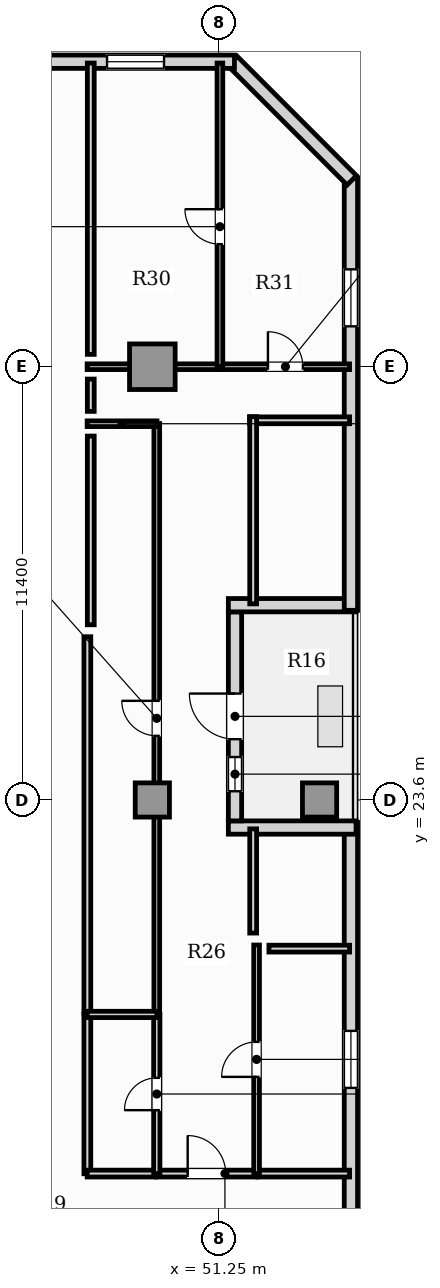
"""IFC4 building model, lengths in metres.
Left out: names, types, materials, properties, quantities, classifications, styles, units other than length and angle.
Written with IfcOpenShell. Run it as: python <this file> out.ifc"""

import sys

from ifc_helpers import new_model, si_unit, direction, frame, frame_2d, origin, origin_2d, place, context, subcontext, project, spatial, rectangle, hollow_rectangle, extrude, element, fill, save


model = new_model("IFC4")
c1 = context("Model", 3, precision=1e-05, world=origin(), true_north=direction((0.0, 1.0)))
c2 = subcontext(c1, "Body", "Model", "MODEL_VIEW")
j1 = project(units=[si_unit("LENGTHUNIT", "METRE"), si_unit("PLANEANGLEUNIT", "RADIAN")], contexts=[c1])
p1 = place(None, origin())
s1 = spatial("IfcSite", under=j1, at=p1, CompositionType="ELEMENT")
p2 = place(p1, origin())
s2 = spatial("IfcBuilding", under=s1, at=p2, CompositionType="ELEMENT")
p3 = place(p2, frame((0.0, 0.0, 104.15)))
s3 = spatial("IfcBuildingStorey", under=s2, at=p3, CompositionType="ELEMENT", Elevation=104.15)
p4 = place(p3, frame((49.5, 35.0, 0.0), z_axis=(0.0, 0.0, 1.0), x_axis=(1.0, 0.0, 0.0)))
e1 = element("IfcColumn", 1, at=p4, inside=s3, PredefinedType="USERDEFINED", context=c2, shape_type="SweptSolid", body=[
    extrude(hollow_rectangle(XDim=1.2, YDim=1.2, WallThickness=0.07, at=origin_2d()), origin(), (0.0, 0.0, 1.0), 3.85),
])
for number, where, z_axis, x_axis in (
    (2, (49.5, 23.6, 0.0), (0.0, 0.0, 1.0), (1.0, 0.0, 0.0)),
    (3, (53.9, 23.6, 0.0), (0.0, 0.0, 1.0), (1.0, 0.0, 0.0)),
):
    element("IfcColumn", number, at=place(p3, frame(where, z_axis=z_axis, x_axis=x_axis)), inside=s3, PredefinedType="COLUMN", context=c2, shape_type="SweptSolid", body=[
        extrude(rectangle(XDim=0.9, YDim=0.9, at=origin_2d()), origin(), (0.0, 0.0, 1.0), 3.85),
    ])
p5 = place(p3, frame((54.725, 3.24, 0.0), z_axis=(0.0, 0.0, 1.0), x_axis=(0.0, 1.0, 0.0)))
e4 = element("IfcWall", 4, at=p5, inside=s3, PredefinedType="SOLIDWALL", context=c2, shape_type="SweptSolid", body=[
    extrude(rectangle(XDim=19.77, YDim=0.35, at=frame_2d((9.885, 0.0))), origin(), (0.0, 0.0, 1.0), 3.6),
])
p6 = place(p5, frame((12.784, 0.0, 0.9)))
e5 = element("IfcOpeningElement", 5, at=p6, cuts=e4, PredefinedType="OPENING", context=c2, shape_type="SweptSolid", body=[
    extrude(rectangle(XDim=1.5, YDim=1.95, at=frame_2d((0.75, 0.975))), frame((0.0, 0.185, 0.0), z_axis=(0.0, -1.0, 0.0), x_axis=(1.0, 0.0, 0.0)), (0.0, 0.0, 1.0), 0.37),
])
p7 = place(p3, frame((54.86, 22.875, 0.0), z_axis=(0.0, 0.0, 1.0), x_axis=(-1.0, 0.0, 0.0)))
e6 = element("IfcWall", 6, at=p7, inside=s3, PredefinedType="SOLIDWALL", context=c2, shape_type="SweptSolid", body=[
    extrude(rectangle(XDim=3.36, YDim=0.35, at=frame_2d((1.68, 0.0))), origin(), (0.0, 0.0, 1.0), 3.6),
])
p8 = place(p3, frame((51.675, 23.05, 0.0), z_axis=(0.0, 0.0, 1.0), x_axis=(0.0, 1.0, 0.0)))
e7 = element("IfcWall", 7, at=p8, inside=s3, PredefinedType="SOLIDWALL", context=c2, shape_type="SweptSolid", body=[
    extrude(rectangle(XDim=5.5, YDim=0.35, at=frame_2d((2.75, 0.0))), origin(), (0.0, 0.0, 1.0), 3.6),
])
p9 = place(p8, frame((2.15, 0.0, 0.0)))
e8 = element("IfcOpeningElement", 8, at=p9, cuts=e7, PredefinedType="OPENING", context=c2, shape_type="SweptSolid", body=[
    extrude(rectangle(XDim=1.2, YDim=2.2, at=frame_2d((0.6, 1.1))), frame((0.0, 0.185, 0.0), z_axis=(0.0, -1.0, 0.0), x_axis=(1.0, 0.0, 0.0)), (0.0, 0.0, 1.0), 0.37),
])
p10 = place(p8, frame((0.78, 0.0, 0.95)))
e9 = element("IfcOpeningElement", 9, at=p10, cuts=e7, PredefinedType="OPENING", context=c2, shape_type="SweptSolid", body=[
    extrude(rectangle(XDim=0.9, YDim=1.5, at=frame_2d((0.45, 0.75))), frame((0.0, 0.185, 0.0), z_axis=(0.0, -1.0, 0.0), x_axis=(1.0, 0.0, 0.0)), (0.0, 0.0, 1.0), 0.37),
])
p11 = place(p3, frame((51.5, 28.725, 0.0), z_axis=(0.0, 0.0, 1.0), x_axis=(1.0, 0.0, 0.0)))
e10 = element("IfcWall", 10, at=p11, inside=s3, PredefinedType="SOLIDWALL", context=c2, shape_type="SweptSolid", body=[
    extrude(rectangle(XDim=3.36, YDim=0.35, at=frame_2d((1.68, 0.0))), origin(), (0.0, 0.0, 1.0), 3.6),
])
p12 = place(p3, frame((54.725, 28.59, 0.0), z_axis=(0.0, 0.0, 1.0), x_axis=(0.0, 1.0, 0.0)))
e11 = element("IfcWall", 11, at=p12, inside=s3, PredefinedType="SOLIDWALL", context=c2, shape_type="SweptSolid", body=[
    extrude(rectangle(XDim=11.37, YDim=0.35, at=frame_2d((5.685, 0.0))), origin(), (0.0, 0.0, 1.0), 3.6),
])
p13 = place(p12, frame((7.472, 0.0, 0.9)))
e12 = element("IfcOpeningElement", 12, at=p13, cuts=e11, PredefinedType="OPENING", context=c2, shape_type="SweptSolid", body=[
    extrude(rectangle(XDim=1.5, YDim=1.95, at=frame_2d((0.75, 0.975))), frame((0.0, 0.185, 0.0), z_axis=(0.0, -1.0, 0.0), x_axis=(1.0, 0.0, 0.0)), (0.0, 0.0, 1.0), 0.37),
])
p14 = place(p3, frame((54.748, 39.905, 0.0), z_axis=(0.0, 0.0, 1.0), x_axis=(-0.707106781187, 0.707106781187, 0.0)))
e13 = element("IfcWall", 13, at=p14, inside=s3, PredefinedType="SOLIDWALL", context=c2, shape_type="SweptSolid", body=[
    extrude(rectangle(XDim=4.446, YDim=0.35, at=frame_2d((2.223, 0.0))), origin(), (0.0, 0.0, 1.0), 3.6),
])
p15 = place(p3, frame((51.66, 43.025, 0.0), z_axis=(0.0, 0.0, 1.0), x_axis=(-1.0, 0.0, 0.0)))
e14 = element("IfcWall", 14, at=p15, inside=s3, PredefinedType="SOLIDWALL", context=c2, shape_type="SweptSolid", body=[
    extrude(rectangle(XDim=45.82, YDim=0.35, at=frame_2d((22.91, 0.0))), origin(), (0.0, 0.0, 1.0), 3.6),
])
p16 = place(p15, frame((42.468, 0.0, 0.9)))
e15 = element("IfcOpeningElement", 15, at=p16, cuts=e14, PredefinedType="OPENING", context=c2, shape_type="SweptSolid", body=[
    extrude(rectangle(XDim=1.5, YDim=1.95, at=frame_2d((0.75, 0.975))), frame((0.0, 0.185, 0.0), z_axis=(0.0, -1.0, 0.0), x_axis=(1.0, 0.0, 0.0)), (0.0, 0.0, 1.0), 0.37),
])
p17 = place(p15, frame((1.853, 0.0, 0.9)))
e16 = element("IfcOpeningElement", 16, at=p17, cuts=e14, PredefinedType="OPENING", context=c2, shape_type="SweptSolid", body=[
    extrude(rectangle(XDim=1.5, YDim=1.95, at=frame_2d((0.75, 0.975))), frame((0.0, 0.185, 0.0), z_axis=(0.0, -1.0, 0.0), x_axis=(1.0, 0.0, 0.0)), (0.0, 0.0, 1.0), 0.37),
])
p18 = place(p15, frame((36.45, 0.0, 0.9)))
e17 = element("IfcOpeningElement", 17, at=p18, cuts=e14, PredefinedType="OPENING", context=c2, shape_type="SweptSolid", body=[
    extrude(rectangle(XDim=1.5, YDim=1.95, at=frame_2d((0.75, 0.975))), frame((0.0, 0.185, 0.0), z_axis=(0.0, -1.0, 0.0), x_axis=(1.0, 0.0, 0.0)), (0.0, 0.0, 1.0), 0.37),
])
p19 = place(p15, frame((32.639, 0.0, 0.9)))
e18 = element("IfcOpeningElement", 18, at=p19, cuts=e14, PredefinedType="OPENING", context=c2, shape_type="SweptSolid", body=[
    extrude(rectangle(XDim=1.5, YDim=1.95, at=frame_2d((0.75, 0.975))), frame((0.0, 0.185, 0.0), z_axis=(0.0, -1.0, 0.0), x_axis=(1.0, 0.0, 0.0)), (0.0, 0.0, 1.0), 0.37),
])
p20 = place(p15, frame((27.743, 0.0, 0.9)))
e19 = element("IfcOpeningElement", 19, at=p20, cuts=e14, PredefinedType="OPENING", context=c2, shape_type="SweptSolid", body=[
    extrude(rectangle(XDim=1.5, YDim=1.95, at=frame_2d((0.75, 0.975))), frame((0.0, 0.185, 0.0), z_axis=(0.0, -1.0, 0.0), x_axis=(1.0, 0.0, 0.0)), (0.0, 0.0, 1.0), 0.37),
])
p21 = place(p15, frame((23.711, 0.0, 0.9)))
e20 = element("IfcOpeningElement", 20, at=p21, cuts=e14, PredefinedType="OPENING", context=c2, shape_type="SweptSolid", body=[
    extrude(rectangle(XDim=1.5, YDim=1.95, at=frame_2d((0.75, 0.975))), frame((0.0, 0.185, 0.0), z_axis=(0.0, -1.0, 0.0), x_axis=(1.0, 0.0, 0.0)), (0.0, 0.0, 1.0), 0.37),
])
p22 = place(p15, frame((19.194, 0.0, 0.9)))
e21 = element("IfcOpeningElement", 21, at=p22, cuts=e14, PredefinedType="OPENING", context=c2, shape_type="SweptSolid", body=[
    extrude(rectangle(XDim=1.5, YDim=1.95, at=frame_2d((0.75, 0.975))), frame((0.0, 0.185, 0.0), z_axis=(0.0, -1.0, 0.0), x_axis=(1.0, 0.0, 0.0)), (0.0, 0.0, 1.0), 0.37),
])
p23 = place(p15, frame((14.876, 0.0, 0.9)))
e22 = element("IfcOpeningElement", 22, at=p23, cuts=e14, PredefinedType="OPENING", context=c2, shape_type="SweptSolid", body=[
    extrude(rectangle(XDim=1.5, YDim=1.95, at=frame_2d((0.75, 0.975))), frame((0.0, 0.185, 0.0), z_axis=(0.0, -1.0, 0.0), x_axis=(1.0, 0.0, 0.0)), (0.0, 0.0, 1.0), 0.37),
])
p24 = place(p15, frame((11.167, 0.0, 0.9)))
e23 = element("IfcOpeningElement", 23, at=p24, cuts=e14, PredefinedType="OPENING", context=c2, shape_type="SweptSolid", body=[
    extrude(rectangle(XDim=1.5, YDim=1.95, at=frame_2d((0.75, 0.975))), frame((0.0, 0.185, 0.0), z_axis=(0.0, -1.0, 0.0), x_axis=(1.0, 0.0, 0.0)), (0.0, 0.0, 1.0), 0.37),
])
p25 = place(p15, frame((7.337, 0.0, 0.9)))
e24 = element("IfcOpeningElement", 24, at=p25, cuts=e14, PredefinedType="OPENING", context=c2, shape_type="SweptSolid", body=[
    extrude(rectangle(XDim=1.5, YDim=1.95, at=frame_2d((0.75, 0.975))), frame((0.0, 0.185, 0.0), z_axis=(0.0, -1.0, 0.0), x_axis=(1.0, 0.0, 0.0)), (0.0, 0.0, 1.0), 0.37),
])
p26 = place(p3, frame((49.612, 13.77, 0.0), z_axis=(0.0, 0.0, 1.0), x_axis=(1.0, 0.0, 0.0)))
e25 = element("IfcWall", 25, at=p26, inside=s3, PredefinedType="PARTITIONING", context=c2, shape_type="SweptSolid", body=[
    extrude(rectangle(XDim=2.636, YDim=0.18, at=frame_2d((1.318, 0.0))), origin(), (0.0, 0.0, 1.0), 3.6),
])
p27 = place(p26, frame((0.818, 0.0, 0.0)))
e26 = element("IfcOpeningElement", 26, at=p27, cuts=e25, PredefinedType="OPENING", context=c2, shape_type="SweptSolid", body=[
    extrude(rectangle(XDim=1.0, YDim=2.15, at=frame_2d((0.5, 1.075))), frame((0.0, 0.1, 0.0), z_axis=(0.0, -1.0, 0.0), x_axis=(1.0, 0.0, 0.0)), (0.0, 0.0, 1.0), 0.2),
])
p28 = place(p3, frame((47.79, 13.765, 0.0), z_axis=(0.0, 0.0, 1.0), x_axis=(0.0, 1.0, 0.0)))
e27 = element("IfcWall", 27, at=p28, inside=s3, PredefinedType="PARTITIONING", context=c2, shape_type="SweptSolid", body=[
    extrude(rectangle(XDim=4.198, YDim=0.18, at=frame_2d((2.099, 0.0))), origin(), (0.0, 0.0, 1.0), 3.6),
])
p29 = place(p3, frame((47.785, 13.77, 0.0), z_axis=(0.0, 0.0, 1.0), x_axis=(1.0, 0.0, 0.0)))
e28 = element("IfcWall", 28, at=p29, inside=s3, PredefinedType="PARTITIONING", context=c2, shape_type="SweptSolid", body=[
    extrude(rectangle(XDim=1.797, YDim=0.18, at=frame_2d((0.898, 0.0))), origin(), (0.0, 0.0, 1.0), 3.6),
])
p30 = place(p3, frame((47.79, 17.992, 0.0), z_axis=(0.0, 0.0, 1.0), x_axis=(0.0, 1.0, 0.0)))
e29 = element("IfcWall", 29, at=p30, inside=s3, PredefinedType="PARTITIONING", context=c2, shape_type="SweptSolid", body=[
    extrude(rectangle(XDim=9.903, YDim=0.18, at=frame_2d((4.951, 0.0))), origin(), (0.0, 0.0, 1.0), 3.6),
])
p31 = place(p3, frame((52.278, 13.77, 0.0), z_axis=(0.0, 0.0, 1.0), x_axis=(1.0, 0.0, 0.0)))
e30 = element("IfcWall", 30, at=p31, inside=s3, PredefinedType="PARTITIONING", context=c2, shape_type="SweptSolid", body=[
    extrude(rectangle(XDim=2.412, YDim=0.18, at=frame_2d((1.206, 0.0))), origin(), (0.0, 0.0, 1.0), 3.6),
])
p32 = place(p3, frame((49.617, 13.765, 0.0), z_axis=(0.0, 0.0, 1.0), x_axis=(0.0, 1.0, 0.0)))
e31 = element("IfcWall", 31, at=p32, inside=s3, PredefinedType="PLUMBINGWALL", context=c2, shape_type="SweptSolid", body=[
    extrude(rectangle(XDim=4.198, YDim=0.165, at=frame_2d((2.099, 0.0))), origin(), (0.0, 0.0, 1.0), 3.056),
])
p33 = place(p32, frame((1.674, 0.0, 0.0)))
e32 = element("IfcOpeningElement", 32, at=p33, cuts=e31, PredefinedType="OPENING", context=c2, shape_type="SweptSolid", body=[
    extrude(rectangle(XDim=0.85, YDim=2.1, at=frame_2d((0.425, 1.05))), frame((0.0, 0.093, 0.0), z_axis=(0.0, -1.0, 0.0), x_axis=(1.0, 0.0, 0.0)), (0.0, 0.0, 1.0), 0.185),
])
p34 = place(p3, frame((49.617, 17.992, 0.0), z_axis=(0.0, 0.0, 1.0), x_axis=(0.0, 1.0, 0.0)))
e33 = element("IfcWall", 33, at=p34, inside=s3, PredefinedType="PARTITIONING", context=c2, shape_type="SweptSolid", body=[
    extrude(rectangle(XDim=15.513, YDim=0.15, at=frame_2d((7.756, 0.0))), origin(), (0.0, 0.0, 1.0), 3.056),
])
p35 = place(p34, frame((7.296, 0.0, 0.0)))
e34 = element("IfcOpeningElement", 34, at=p35, cuts=e33, PredefinedType="OPENING", context=c2, shape_type="SweptSolid", body=[
    extrude(rectangle(XDim=0.92, YDim=2.1, at=frame_2d((0.46, 1.05))), frame((0.0, 0.085, 0.0), z_axis=(0.0, -1.0, 0.0), x_axis=(1.0, 0.0, 0.0)), (0.0, 0.0, 1.0), 0.17),
])
p36 = place(p3, frame((47.785, 33.5, 0.0), z_axis=(0.0, 0.0, 1.0), x_axis=(1.0, 0.0, 0.0)))
e35 = element("IfcWall", 35, at=p36, inside=s3, PredefinedType="PARTITIONING", context=c2, shape_type="SweptSolid", body=[
    extrude(rectangle(XDim=1.837, YDim=0.15, at=frame_2d((0.918, 0.0))), origin(), (0.0, 0.0, 1.0), 3.6),
])
p37 = place(p3, frame((52.243, 13.765, 0.0), z_axis=(0.0, 0.0, 1.0), x_axis=(0.0, 1.0, 0.0)))
e36 = element("IfcWall", 36, at=p37, inside=s3, PredefinedType="PARTITIONING", context=c2, shape_type="SweptSolid", body=[
    extrude(rectangle(XDim=6.019, YDim=0.15, at=frame_2d((3.009, 0.0))), origin(), (0.0, 0.0, 1.0), 3.6),
])
p38 = place(p37, frame((2.549, 0.0, 0.0)))
e37 = element("IfcOpeningElement", 37, at=p38, cuts=e36, PredefinedType="OPENING", context=c2, shape_type="SweptSolid", body=[
    extrude(rectangle(XDim=0.92, YDim=2.1, at=frame_2d((0.46, 1.05))), frame((0.0, 0.085, 0.0), z_axis=(0.0, -1.0, 0.0), x_axis=(1.0, 0.0, 0.0)), (0.0, 0.0, 1.0), 0.17),
])
p39 = place(p3, frame((47.785, 35.0, 0.0), z_axis=(0.0, 0.0, 1.0), x_axis=(1.0, 0.0, 0.0)))
e38 = element("IfcWall", 38, at=p39, inside=s3, PredefinedType="PARTITIONING", context=c2, shape_type="SweptSolid", body=[
    extrude(rectangle(XDim=3.498, YDim=0.15, at=frame_2d((1.749, 0.0))), origin(), (0.0, 0.0, 1.0), 2.983),
])
p40 = place(p3, frame((51.313, 35.0, 0.0), z_axis=(0.0, 0.0, 1.0), x_axis=(1.0, 0.0, 0.0)))
e39 = element("IfcWall", 39, at=p40, inside=s3, PredefinedType="PARTITIONING", context=c2, shape_type="SweptSolid", body=[
    extrude(rectangle(XDim=3.377, YDim=0.15, at=frame_2d((1.688, 0.0))), origin(), (0.0, 0.0, 1.0), 3.6),
])
p41 = place(p40, frame((1.229, 0.0, 0.0)))
e40 = element("IfcOpeningElement", 40, at=p41, cuts=e39, PredefinedType="OPENING", context=c2, shape_type="SweptSolid", body=[
    extrude(rectangle(XDim=0.92, YDim=2.1, at=frame_2d((0.46, 1.05))), frame((0.0, 0.085, 0.0), z_axis=(0.0, -1.0, 0.0), x_axis=(1.0, 0.0, 0.0)), (0.0, 0.0, 1.0), 0.17),
])
p42 = place(p3, frame((47.785, 17.957, 0.0), z_axis=(0.0, 0.0, 1.0), x_axis=(1.0, 0.0, 0.0)))
e41 = element("IfcWall", 41, at=p42, inside=s3, PredefinedType="PLUMBINGWALL", context=c2, shape_type="SweptSolid", body=[
    extrude(rectangle(XDim=1.837, YDim=0.165, at=frame_2d((0.918, 0.0))), origin(), (0.0, 0.0, 1.0), 3.6),
])
p43 = place(p3, frame((51.278, 34.995, 0.0), z_axis=(0.0, 0.0, 1.0), x_axis=(0.0, 1.0, 0.0)))
e42 = element("IfcWall", 42, at=p43, inside=s3, PredefinedType="PARTITIONING", context=c2, shape_type="SweptSolid", body=[
    extrude(rectangle(XDim=7.995, YDim=0.15, at=frame_2d((3.998, 0.0))), origin(), (0.0, 0.0, 1.0), 3.6),
])
p44 = place(p43, frame((3.23, 0.0, 0.0)))
e43 = element("IfcOpeningElement", 43, at=p44, cuts=e42, PredefinedType="OPENING", context=c2, shape_type="SweptSolid", body=[
    extrude(rectangle(XDim=0.92, YDim=2.1, at=frame_2d((0.46, 1.05))), frame((0.0, 0.085, 0.0), z_axis=(0.0, -1.0, 0.0), x_axis=(1.0, 0.0, 0.0)), (0.0, 0.0, 1.0), 0.17),
])
p45 = place(p3, frame((47.88, 33.825, 0.0), z_axis=(0.0, 0.0, 1.0), x_axis=(0.0, 1.0, 0.0)))
e44 = element("IfcWall", 44, at=p45, inside=s3, PredefinedType="PARTITIONING", context=c2, shape_type="SweptSolid", body=[
    extrude(rectangle(XDim=0.85, YDim=0.18, at=frame_2d((0.425, 0.0))), origin(), (0.0, 0.0, 1.0), 3.6),
])
p46 = place(p3, frame((54.69, 33.59, 0.0), z_axis=(0.0, 0.0, 1.0), x_axis=(-1.0, 0.0, 0.0)))
e45 = element("IfcWall", 45, at=p46, inside=s3, PredefinedType="PARTITIONING", context=c2, shape_type="SweptSolid", body=[
    extrude(rectangle(XDim=2.632, YDim=0.18, at=frame_2d((1.316, 0.0))), origin(), (0.0, 0.0, 1.0), 3.6),
])
p47 = place(p3, frame((52.153, 33.685, 0.0), z_axis=(0.0, 0.0, 1.0), x_axis=(0.0, -1.0, 0.0)))
e46 = element("IfcWall", 46, at=p47, inside=s3, PredefinedType="PARTITIONING", context=c2, shape_type="SweptSolid", body=[
    extrude(rectangle(XDim=4.925, YDim=0.18, at=frame_2d((2.462, 0.0))), origin(), (0.0, 0.0, 1.0), 3.6),
])
p48 = place(p3, frame((52.153, 22.84, 0.0), z_axis=(0.0, 0.0, 1.0), x_axis=(0.0, -1.0, 0.0)))
e47 = element("IfcWall", 47, at=p48, inside=s3, PredefinedType="PARTITIONING", context=c2, shape_type="SweptSolid", body=[
    extrude(rectangle(XDim=2.741, YDim=0.18, at=frame_2d((1.371, 0.0))), origin(), (0.0, 0.0, 1.0), 3.6),
])
p49 = place(p3, frame((47.88, 28.21, 0.0), z_axis=(0.0, 0.0, 1.0), x_axis=(0.0, 1.0, 0.0)))
e48 = element("IfcWall", 48, at=p49, inside=s3, PredefinedType="PARTITIONING", context=c2, shape_type="SweptSolid", body=[
    extrude(rectangle(XDim=4.965, YDim=0.18, at=frame_2d((2.482, 0.0))), origin(), (0.0, 0.0, 1.0), 3.6),
])
p50 = place(p3, frame((52.568, 19.689, 0.0), z_axis=(0.0, 0.0, 1.0), x_axis=(1.0, 0.0, 0.0)))
e49 = element("IfcWall", 49, at=p50, inside=s3, PredefinedType="PARTITIONING", context=c2, shape_type="SweptSolid", body=[
    extrude(rectangle(XDim=2.122, YDim=0.18, at=frame_2d((1.061, 0.0))), origin(), (0.0, 0.0, 1.0), 3.6),
])
p51 = place(p3, frame((47.88, 35.325, 0.0), z_axis=(0.0, 0.0, 1.0), x_axis=(0.0, 1.0, 0.0)))
e50 = element("IfcWall", 50, at=p51, inside=s3, PredefinedType="PARTITIONING", context=c2, shape_type="SweptSolid", body=[
    extrude(rectangle(XDim=7.665, YDim=0.18, at=frame_2d((3.833, 0.0))), origin(), (0.0, 0.0, 1.0), 3.6),
])
p52 = place(p9, frame((1.2, 0.0, 0.0), z_axis=(0.0, 0.0, 1.0), x_axis=(-1.0, 0.0, 0.0)))
e51 = element("IfcDoor", 51, at=p52, inside=s3, OperationType="SINGLE_SWING_LEFT", PredefinedType="DOOR", context=c2, shape_type="SweptSolid", body=[
    extrude(rectangle(XDim=1.2, YDim=2.2, at=frame_2d((0.6, 1.1))), frame((0.0, 0.025, 0.0), z_axis=(0.0, -1.0, 0.0), x_axis=(1.0, 0.0, 0.0)), (0.0, 0.0, 1.0), 0.05),
])
fill(e8, e51)
p53 = place(p10, origin())
e52 = element("IfcWindow", 52, at=p53, inside=s3, PartitioningType="SINGLE_PANEL", PredefinedType="WINDOW", context=c2, shape_type="SweptSolid", body=[
    extrude(rectangle(XDim=0.9, YDim=1.5, at=frame_2d((0.45, 0.75))), frame((0.0, 0.03, 0.0), z_axis=(0.0, -1.0, 0.0), x_axis=(1.0, 0.0, 0.0)), (0.0, 0.0, 1.0), 0.06),
])
fill(e9, e52)
p54 = place(p6, origin())
e53 = element("IfcWindow", 53, at=p54, inside=s3, PartitioningType="SINGLE_PANEL", PredefinedType="WINDOW", context=c2, shape_type="SweptSolid", body=[
    extrude(rectangle(XDim=1.5, YDim=1.95, at=frame_2d((0.75, 0.975))), frame((0.0, 0.03, 0.0), z_axis=(0.0, -1.0, 0.0), x_axis=(1.0, 0.0, 0.0)), (0.0, 0.0, 1.0), 0.06),
])
fill(e5, e53)
p55 = place(p17, origin())
e54 = element("IfcWindow", 54, at=p55, inside=s3, PartitioningType="SINGLE_PANEL", PredefinedType="WINDOW", context=c2, shape_type="SweptSolid", body=[
    extrude(rectangle(XDim=1.5, YDim=1.95, at=frame_2d((0.75, 0.975))), frame((0.0, 0.03, 0.0), z_axis=(0.0, -1.0, 0.0), x_axis=(1.0, 0.0, 0.0)), (0.0, 0.0, 1.0), 0.06),
])
fill(e16, e54)
p56 = place(p13, origin())
e55 = element("IfcWindow", 55, at=p56, inside=s3, PartitioningType="SINGLE_PANEL", PredefinedType="WINDOW", context=c2, shape_type="SweptSolid", body=[
    extrude(rectangle(XDim=1.5, YDim=1.95, at=frame_2d((0.75, 0.975))), frame((0.0, 0.03, 0.0), z_axis=(0.0, -1.0, 0.0), x_axis=(1.0, 0.0, 0.0)), (0.0, 0.0, 1.0), 0.06),
])
fill(e12, e55)
p57 = place(p27, origin())
e56 = element("IfcDoor", 56, at=p57, inside=s3, OperationType="SINGLE_SWING_LEFT", PredefinedType="DOOR", context=c2, shape_type="SweptSolid", body=[
    extrude(rectangle(XDim=1.0, YDim=2.15, at=frame_2d((0.5, 1.075))), frame((0.0, 0.025, 0.0), z_axis=(0.0, -1.0, 0.0), x_axis=(1.0, 0.0, 0.0)), (0.0, 0.0, 1.0), 0.05),
])
fill(e26, e56)
p58 = place(p33, origin())
e57 = element("IfcDoor", 57, at=p58, inside=s3, OperationType="SINGLE_SWING_LEFT", PredefinedType="DOOR", context=c2, shape_type="SweptSolid", body=[
    extrude(rectangle(XDim=0.85, YDim=2.1, at=frame_2d((0.425, 1.05))), frame((0.0, 0.025, 0.0), z_axis=(0.0, -1.0, 0.0), x_axis=(1.0, 0.0, 0.0)), (0.0, 0.0, 1.0), 0.05),
])
fill(e32, e57)
p59 = place(p35, origin())
e58 = element("IfcDoor", 58, at=p59, inside=s3, OperationType="SINGLE_SWING_RIGHT", PredefinedType="DOOR", context=c2, shape_type="SweptSolid", body=[
    extrude(rectangle(XDim=0.92, YDim=2.1, at=frame_2d((0.46, 1.05))), frame((0.0, 0.025, 0.0), z_axis=(0.0, -1.0, 0.0), x_axis=(1.0, 0.0, 0.0)), (0.0, 0.0, 1.0), 0.05),
])
fill(e34, e58)
p60 = place(p38, origin())
e59 = element("IfcDoor", 59, at=p60, inside=s3, OperationType="SINGLE_SWING_LEFT", PredefinedType="DOOR", context=c2, shape_type="SweptSolid", body=[
    extrude(rectangle(XDim=0.92, YDim=2.1, at=frame_2d((0.46, 1.05))), frame((0.0, 0.025, 0.0), z_axis=(0.0, -1.0, 0.0), x_axis=(1.0, 0.0, 0.0)), (0.0, 0.0, 1.0), 0.05),
])
fill(e37, e59)
p61 = place(p41, origin())
e60 = element("IfcDoor", 60, at=p61, inside=s3, OperationType="SINGLE_SWING_LEFT", PredefinedType="DOOR", context=c2, shape_type="SweptSolid", body=[
    extrude(rectangle(XDim=0.92, YDim=2.1, at=frame_2d((0.46, 1.05))), frame((0.0, 0.025, 0.0), z_axis=(0.0, -1.0, 0.0), x_axis=(1.0, 0.0, 0.0)), (0.0, 0.0, 1.0), 0.05),
])
fill(e40, e60)
p62 = place(p44, origin())
e61 = element("IfcDoor", 61, at=p62, inside=s3, OperationType="SINGLE_SWING_RIGHT", PredefinedType="DOOR", context=c2, shape_type="SweptSolid", body=[
    extrude(rectangle(XDim=0.92, YDim=2.1, at=frame_2d((0.46, 1.05))), frame((0.0, 0.025, 0.0), z_axis=(0.0, -1.0, 0.0), x_axis=(1.0, 0.0, 0.0)), (0.0, 0.0, 1.0), 0.05),
])
fill(e43, e61)
save(model, sys.argv[1])
